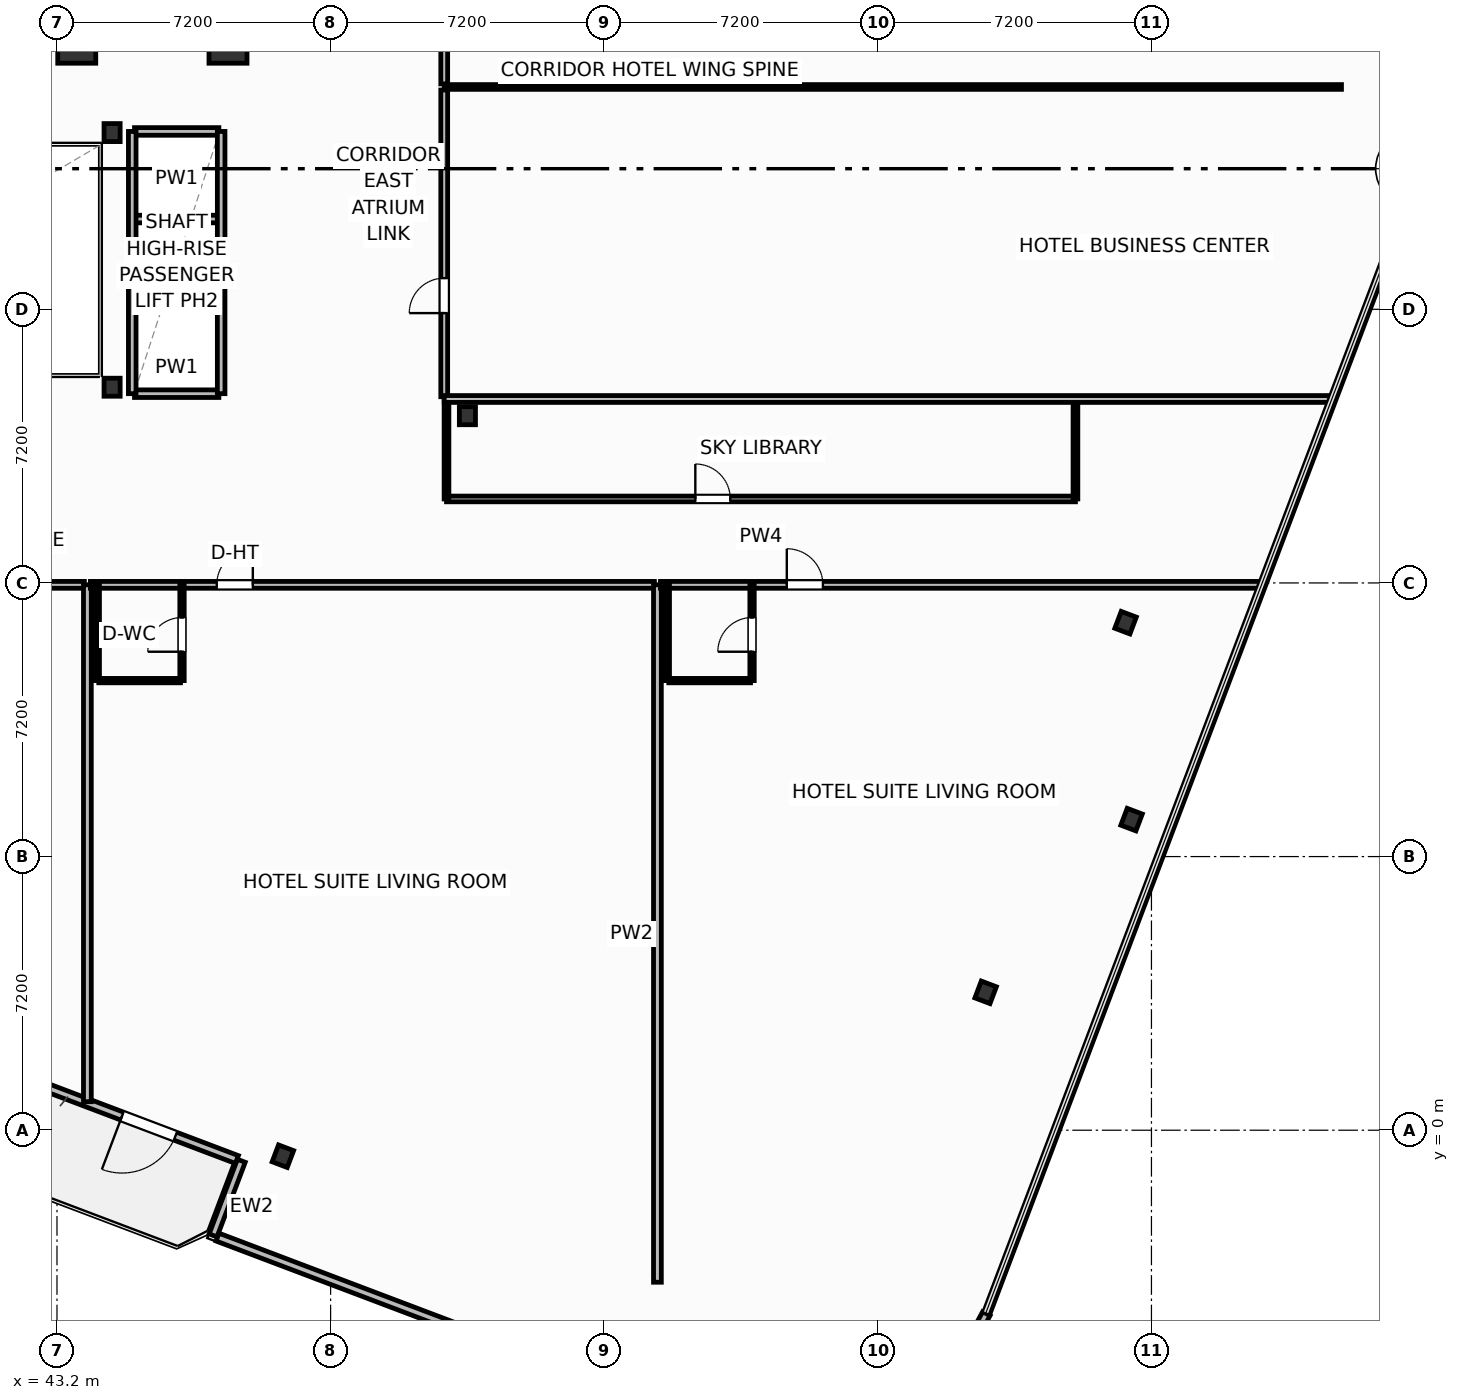
"""IFC4 building model, lengths in metres.
Left out: names, types, materials, properties, quantities, classifications, styles, units other than length and angle.
Written with IfcOpenShell. Run it as: python <this file> out.ifc"""

import sys

from ifc_helpers import new_model, si_unit, direction, frame, frame_2d, origin, origin_2d, place, context, subcontext, project, spatial, rectangle, i_section, extrude, element, fill, save


model = new_model("IFC4")
c1 = context("Model", 3, precision=1e-05, world=origin(), true_north=direction((0.0, 1.0)))
c2 = subcontext(c1, "Body", "Model", "MODEL_VIEW")
j1 = project(units=[si_unit("LENGTHUNIT", "METRE"), si_unit("PLANEANGLEUNIT", "RADIAN")], contexts=[c1])
p1 = place(None, origin())
s1 = spatial("IfcSite", under=j1, at=p1, CompositionType="ELEMENT")
p2 = place(p1, origin())
s2 = spatial("IfcBuilding", under=s1, at=p2, CompositionType="ELEMENT")
p3 = place(p2, frame((0.0, 0.0, 94.7)))
s3 = spatial("IfcBuildingStorey", under=s2, at=p3, CompositionType="ELEMENT", Elevation=94.7)
for number, where, z_axis, x_axis in (
    (1, (43.72, 28.75, 0.0), (0.0, 0.0, 1.0), (1.0, 0.0, 0.0)),
    (2, (47.7, 28.75, 0.0), (0.0, 0.0, 1.0), (1.0, 0.0, 0.0)),
):
    element("IfcColumn", number, at=place(p3, frame(where, z_axis=z_axis, x_axis=x_axis)), inside=s3, PredefinedType="COLUMN", context=c2, shape_type="SweptSolid", body=[
        extrude(rectangle(XDim=1.0, YDim=1.35, at=origin_2d()), origin(), (0.0, 0.0, 1.0), 3.7),
    ])
for number, where, z_axis, x_axis in (
    (3, (44.65, 19.55, 0.0), (0.0, 0.0, 1.0), (1.0, 0.0, 0.0)),
    (4, (44.65, 26.25, 0.0), (0.0, 0.0, 1.0), (1.0, 0.0, 0.0)),
    (5, (54.0, 18.8, 0.0), (0.0, 0.0, 1.0), (1.0, 0.0, 0.0)),
    (6, (49.144, -0.684, 0.0), (0.0, 0.0, 1.0), (0.935, -0.354, 0.0)),
    (7, (67.637, 3.628, 0.0), (0.0, 0.0, 1.0), (0.935, -0.354, 0.0)),
    (8, (71.477, 8.173, 0.0), (0.0, 0.0, 1.0), (0.935, -0.354, 0.0)),
    (9, (71.319, 13.354, 0.0), (0.0, 0.0, 1.0), (0.935, -0.354, 0.0)),
):
    element("IfcColumn", number, at=place(p3, frame(where, z_axis=z_axis, x_axis=x_axis)), inside=s3, PredefinedType="COLUMN", context=c2, shape_type="SweptSolid", body=[
        extrude(i_section(OverallWidth=0.424, OverallDepth=0.474, WebThickness=0.048, FlangeThickness=0.077, FilletRadius=0.025, at=origin_2d()), origin(), (0.0, 0.0, 1.0), 3.7),
    ])
p4 = place(p3, frame((47.935, -0.771, 0.0), z_axis=(0.0, 0.0, 1.0), x_axis=(-0.935227640088, 0.354046976001, 0.0)))
e10 = element("IfcWall", 10, at=p4, inside=s3, PredefinedType="SOLIDWALL", context=c2, shape_type="SweptSolid", body=[
    extrude(rectangle(XDim=6.0, YDim=0.22, at=frame_2d((3.0, 0.0))), origin(), (0.0, 0.0, 1.0), 2.73),
])
p5 = place(p4, frame((1.732, 0.0, 0.0)))
e11 = element("IfcOpeningElement", 11, at=p5, cuts=e10, PredefinedType="OPENING", context=c2, shape_type="SweptSolid", body=[
    extrude(rectangle(XDim=1.5, YDim=2.25, at=frame_2d((0.75, 1.125))), frame((0.0, 0.12, 0.0), z_axis=(0.0, -1.0, 0.0), x_axis=(1.0, 0.0, 0.0)), (0.0, 0.0, 1.0), 0.24),
])
p6 = place(p3, frame((48.051, -0.805, 0.0), z_axis=(0.0, 0.0, 1.0), x_axis=(-0.353988291547, -0.935249854022, 0.0)))
e12 = element("IfcWall", 12, at=p6, inside=s3, PredefinedType="SOLIDWALL", context=c2, shape_type="SweptSolid", body=[
    extrude(rectangle(XDim=2.1, YDim=0.22, at=frame_2d((1.05, 0.0))), origin(), (0.0, 0.0, 1.0), 2.73),
])
p7 = place(p3, frame((47.424, -2.813, 0.0), z_axis=(0.0, 0.0, 1.0), x_axis=(0.935225962032, -0.354051408614, 0.0)))
e13 = element("IfcWall", 13, at=p7, inside=s3, PredefinedType="SOLIDWALL", context=c2, shape_type="SweptSolid", body=[
    extrude(rectangle(XDim=14.347, YDim=0.22, at=frame_2d((7.173, 0.0))), origin(), (0.0, 0.0, 1.0), 2.73),
])
p8 = place(p7, frame((6.348, 0.0, 0.8)))
e14 = element("IfcOpeningElement", 14, at=p8, cuts=e13, PredefinedType="OPENING", context=c2, shape_type="SweptSolid", body=[
    extrude(rectangle(XDim=1.65, YDim=1.65, at=frame_2d((0.825, 0.825))), frame((0.0, 0.12, 0.0), z_axis=(0.0, -1.0, 0.0), x_axis=(1.0, 0.0, 0.0)), (0.0, 0.0, 1.0), 0.24),
])
p9 = place(p3, frame((67.015, -6.019, 0.0), z_axis=(0.0, 0.0, 1.0), x_axis=(0.473077364598, 0.881020889142, 0.0)))
e15 = element("IfcWall", 15, at=p9, inside=s3, PredefinedType="SOLIDWALL", context=c2, shape_type="SweptSolid", body=[
    extrude(rectangle(XDim=1.353, YDim=0.22, at=frame_2d((0.677, 0.0))), origin(), (0.0, 0.0, 1.0), 2.73),
])
p10 = place(p3, frame((53.45, 16.61, 0.0), z_axis=(0.0, 0.0, 1.0), x_axis=(1.0, 0.0, 0.0)))
e16 = element("IfcWall", 16, at=p10, inside=s3, PredefinedType="PARTITIONING", context=c2, shape_type="SweptSolid", body=[
    extrude(rectangle(XDim=16.55, YDim=0.15, at=frame_2d((8.275, 0.0))), origin(), (0.0, 0.0, 1.0), 2.58),
])
p11 = place(p10, frame((6.548, 0.0, 0.0)))
e17 = element("IfcOpeningElement", 17, at=p11, cuts=e16, PredefinedType="OPENING", context=c2, shape_type="SweptSolid", body=[
    extrude(rectangle(XDim=0.92, YDim=2.05, at=frame_2d((0.46, 1.025))), frame((0.0, 0.085, 0.0), z_axis=(0.0, -1.0, 0.0), x_axis=(1.0, 0.0, 0.0)), (0.0, 0.0, 1.0), 0.17),
])
p12 = place(p3, frame((53.45, 16.61, 0.0), z_axis=(0.0, 0.0, 1.0), x_axis=(0.0, 1.0, 0.0)))
e18 = element("IfcWall", 18, at=p12, inside=s3, PredefinedType="PARTITIONING", context=c2, shape_type="SweptSolid", body=[
    extrude(rectangle(XDim=2.63, YDim=0.125, at=frame_2d((1.315, 0.0))), origin(), (0.0, 0.0, 1.0), 2.58),
])
p13 = place(p3, frame((70.0, 16.61, 0.0), z_axis=(0.0, 0.0, 1.0), x_axis=(0.0, 1.0, 0.0)))
e19 = element("IfcWall", 19, at=p13, inside=s3, PredefinedType="PARTITIONING", context=c2, shape_type="SweptSolid", body=[
    extrude(rectangle(XDim=2.63, YDim=0.125, at=frame_2d((1.315, 0.0))), origin(), (0.0, 0.0, 1.0), 2.824),
])
p14 = place(p3, frame((26.08, 14.35, 0.0), z_axis=(0.0, 0.0, 1.0), x_axis=(1.0, 0.0, 0.0)))
e20 = element("IfcWall", 20, at=p14, inside=s3, PredefinedType="PARTITIONING", context=c2, shape_type="SweptSolid", body=[
    extrude(rectangle(XDim=17.84, YDim=0.18, at=frame_2d((8.92, 0.0))), origin(), (0.0, 0.0, 1.0), 3.45),
])
p15 = place(p14, frame((8.445, 0.0, 0.0)))
e21 = element("IfcOpeningElement", 21, at=p15, cuts=e20, PredefinedType="OPENING", context=c2, shape_type="SweptSolid", body=[
    extrude(rectangle(XDim=0.95, YDim=2.05, at=frame_2d((0.475, 1.025))), frame((0.0, 0.1, 0.0), z_axis=(0.0, -1.0, 0.0), x_axis=(1.0, 0.0, 0.0)), (0.0, 0.0, 1.0), 0.2),
])
p16 = place(p3, frame((44.0, 0.75, 0.0), z_axis=(0.0, 0.0, 1.0), x_axis=(0.0, 1.0, 0.0)))
e22 = element("IfcWall", 22, at=p16, inside=s3, PredefinedType="PARTITIONING", context=c2, shape_type="SweptSolid", body=[
    extrude(rectangle(XDim=13.6, YDim=0.205, at=frame_2d((6.8, 0.0))), origin(), (0.0, 0.0, 1.0), 3.45),
])
p17 = place(p3, frame((44.08, 14.35, 0.0), z_axis=(0.0, 0.0, 1.0), x_axis=(1.0, 0.0, 0.0)))
e23 = element("IfcWall", 23, at=p17, inside=s3, PredefinedType="PARTITIONING", context=c2, shape_type="SweptSolid", body=[
    extrude(rectangle(XDim=14.84, YDim=0.18, at=frame_2d((7.42, 0.0))), origin(), (0.0, 0.0, 1.0), 3.45),
])
p18 = place(p17, frame((3.323, 0.0, 0.0)))
e24 = element("IfcOpeningElement", 24, at=p18, cuts=e23, PredefinedType="OPENING", context=c2, shape_type="SweptSolid", body=[
    extrude(rectangle(XDim=0.95, YDim=2.15, at=frame_2d((0.475, 1.075))), frame((0.0, 0.1, 0.0), z_axis=(0.0, -1.0, 0.0), x_axis=(1.0, 0.0, 0.0)), (0.0, 0.0, 1.0), 0.2),
])
p19 = place(p3, frame((44.3, 11.83, 0.0), z_axis=(0.0, 0.0, 1.0), x_axis=(1.0, 0.0, 0.0)))
e25 = element("IfcWall", 25, at=p19, inside=s3, PredefinedType="PARTITIONING", context=c2, shape_type="SweptSolid", body=[
    extrude(rectangle(XDim=2.15, YDim=0.115, at=frame_2d((1.075, 0.0))), origin(), (0.0, 0.0, 1.0), 3.45),
])
p20 = place(p3, frame((46.49, 11.83, 0.0), z_axis=(0.0, 0.0, 1.0), x_axis=(0.0, 1.0, 0.0)))
e26 = element("IfcWall", 26, at=p20, inside=s3, PredefinedType="PARTITIONING", context=c2, shape_type="SweptSolid", body=[
    extrude(rectangle(XDim=2.52, YDim=0.115, at=frame_2d((1.26, 0.0))), origin(), (0.0, 0.0, 1.0), 3.45),
])
p21 = place(p20, frame((0.76, 0.0, 0.0)))
e27 = element("IfcOpeningElement", 27, at=p21, cuts=e26, PredefinedType="OPENING", context=c2, shape_type="SweptSolid", body=[
    extrude(rectangle(XDim=0.9, YDim=2.05, at=frame_2d((0.45, 1.025))), frame((0.0, 0.067, 0.0), z_axis=(0.0, -1.0, 0.0), x_axis=(1.0, 0.0, 0.0)), (0.0, 0.0, 1.0), 0.135),
])
p22 = place(p3, frame((44.26, 11.83, 0.0), z_axis=(0.0, 0.0, 1.0), x_axis=(0.0, 1.0, 0.0)))
e28 = element("IfcWall", 28, at=p22, inside=s3, PredefinedType="PARTITIONING", context=c2, shape_type="SweptSolid", body=[
    extrude(rectangle(XDim=2.52, YDim=0.115, at=frame_2d((1.26, 0.0))), origin(), (0.0, 0.0, 1.0), 3.45),
])
p23 = place(p3, frame((59.0, -4.0, 0.0), z_axis=(0.0, 0.0, 1.0), x_axis=(0.0, 1.0, 0.0)))
e29 = element("IfcWall", 29, at=p23, inside=s3, PredefinedType="PARTITIONING", context=c2, shape_type="SweptSolid", body=[
    extrude(rectangle(XDim=18.35, YDim=0.205, at=frame_2d((9.175, 0.0))), origin(), (0.0, 0.0, 1.0), 3.45),
])
p24 = place(p3, frame((59.08, 14.35, 0.0), z_axis=(0.0, 0.0, 1.0), x_axis=(1.0, 0.0, 0.0)))
e30 = element("IfcWall", 30, at=p24, inside=s3, PredefinedType="PARTITIONING", context=c2, shape_type="SweptSolid", body=[
    extrude(rectangle(XDim=15.775, YDim=0.18, at=frame_2d((7.888, 0.0))), origin(), (0.0, 0.0, 1.0), 2.58),
])
p25 = place(p24, frame((3.324, 0.0, 0.0)))
e31 = element("IfcOpeningElement", 31, at=p25, cuts=e30, PredefinedType="OPENING", context=c2, shape_type="SweptSolid", body=[
    extrude(rectangle(XDim=0.95, YDim=2.15, at=frame_2d((0.475, 1.075))), frame((0.0, 0.1, 0.0), z_axis=(0.0, -1.0, 0.0), x_axis=(1.0, 0.0, 0.0)), (0.0, 0.0, 1.0), 0.2),
])
p26 = place(p3, frame((59.3, 11.83, 0.0), z_axis=(0.0, 0.0, 1.0), x_axis=(1.0, 0.0, 0.0)))
e32 = element("IfcWall", 32, at=p26, inside=s3, PredefinedType="PARTITIONING", context=c2, shape_type="SweptSolid", body=[
    extrude(rectangle(XDim=2.15, YDim=0.115, at=frame_2d((1.075, 0.0))), origin(), (0.0, 0.0, 1.0), 3.45),
])
p27 = place(p3, frame((61.49, 11.83, 0.0), z_axis=(0.0, 0.0, 1.0), x_axis=(0.0, 1.0, 0.0)))
e33 = element("IfcWall", 33, at=p27, inside=s3, PredefinedType="PARTITIONING", context=c2, shape_type="SweptSolid", body=[
    extrude(rectangle(XDim=2.52, YDim=0.115, at=frame_2d((1.26, 0.0))), origin(), (0.0, 0.0, 1.0), 3.45),
])
p28 = place(p27, frame((0.76, 0.0, 0.0)))
e34 = element("IfcOpeningElement", 34, at=p28, cuts=e33, PredefinedType="OPENING", context=c2, shape_type="SweptSolid", body=[
    extrude(rectangle(XDim=0.9, YDim=2.05, at=frame_2d((0.45, 1.025))), frame((0.0, 0.067, 0.0), z_axis=(0.0, -1.0, 0.0), x_axis=(1.0, 0.0, 0.0)), (0.0, 0.0, 1.0), 0.135),
])
p29 = place(p3, frame((59.26, 11.83, 0.0), z_axis=(0.0, 0.0, 1.0), x_axis=(0.0, 1.0, 0.0)))
e35 = element("IfcWall", 35, at=p29, inside=s3, PredefinedType="PARTITIONING", context=c2, shape_type="SweptSolid", body=[
    extrude(rectangle(XDim=2.52, YDim=0.115, at=frame_2d((1.26, 0.0))), origin(), (0.0, 0.0, 1.0), 3.45),
])
p30 = place(p3, frame((53.39, 19.3, 0.0), z_axis=(0.0, 0.0, 1.0), x_axis=(0.0, 1.0, 0.0)))
e36 = element("IfcWall", 36, at=p30, inside=s3, PredefinedType="PARTITIONING", context=c2, shape_type="SweptSolid", body=[
    extrude(rectangle(XDim=8.07, YDim=0.18, at=frame_2d((4.035, 0.0))), origin(), (0.0, 0.0, 1.0), 3.45),
])
p31 = place(p30, frame((2.2, 0.0, 0.0)))
e37 = element("IfcOpeningElement", 37, at=p31, cuts=e36, PredefinedType="OPENING", context=c2, shape_type="SweptSolid", body=[
    extrude(rectangle(XDim=0.92, YDim=2.05, at=frame_2d((0.46, 1.025))), frame((0.0, 0.1, 0.0), z_axis=(0.0, -1.0, 0.0), x_axis=(1.0, 0.0, 0.0)), (0.0, 0.0, 1.0), 0.2),
])
p32 = place(p3, frame((53.39, 27.53, 0.0), z_axis=(0.0, 0.0, 1.0), x_axis=(0.0, 1.0, 0.0)))
e38 = element("IfcWall", 38, at=p32, inside=s3, PredefinedType="PARTITIONING", context=c2, shape_type="SweptSolid", body=[
    extrude(rectangle(XDim=11.67, YDim=0.18, at=frame_2d((5.835, 0.0))), origin(), (0.0, 0.0, 1.0), 3.45),
])
p33 = place(p32, frame((5.8, 0.0, 0.0)))
e39 = element("IfcOpeningElement", 39, at=p33, cuts=e38, PredefinedType="OPENING", context=c2, shape_type="SweptSolid", body=[
    extrude(rectangle(XDim=0.92, YDim=2.05, at=frame_2d((0.46, 1.025))), frame((0.0, 0.1, 0.0), z_axis=(0.0, -1.0, 0.0), x_axis=(1.0, 0.0, 0.0)), (0.0, 0.0, 1.0), 0.2),
])
p34 = place(p3, frame((53.39, 27.45, 0.0), z_axis=(0.0, 0.0, 1.0), x_axis=(1.0, 0.0, 0.0)))
e40 = element("IfcWall", 40, at=p34, inside=s3, PredefinedType="PARTITIONING", context=c2, shape_type="SweptSolid", body=[
    extrude(rectangle(XDim=23.61, YDim=0.125, at=frame_2d((11.805, 0.0))), origin(), (0.0, 0.0, 1.0), 3.45),
])
p35 = place(p3, frame((53.39, 19.24, 0.0), z_axis=(0.0, 0.0, 1.0), x_axis=(1.0, 0.0, 0.0)))
e41 = element("IfcWall", 41, at=p35, inside=s3, PredefinedType="PARTITIONING", context=c2, shape_type="SweptSolid", body=[
    extrude(rectangle(XDim=23.317, YDim=0.18, at=frame_2d((11.658, 0.0))), origin(), (0.0, 0.0, 1.0), 3.45),
])
for number, where, z_axis, x_axis in (
    (42, (45.24, 21.675, 0.0), (0.0, 0.0, 1.0), (1.0, 0.0, 0.0)),
    (43, (45.24, 23.975, 0.0), (0.0, 0.0, 1.0), (1.0, 0.0, 0.0)),
):
    element("IfcWall", number, at=place(p3, frame(where, z_axis=z_axis, x_axis=x_axis)), inside=s3, PredefinedType="PARTITIONING", context=c2, shape_type="SweptSolid", body=[
        extrude(rectangle(XDim=2.22, YDim=0.2, at=frame_2d((1.11, 0.0))), origin(), (0.0, 0.0, 1.0), 3.45),
    ])
p36 = place(p3, frame((45.24, 19.38, 0.0), z_axis=(0.0, 0.0, 1.0), x_axis=(1.0, 0.0, 0.0)))
e44 = element("IfcWall", 44, at=p36, inside=s3, PredefinedType="PARTITIONING", context=c2, shape_type="SweptSolid", body=[
    extrude(rectangle(XDim=2.22, YDim=0.2, at=frame_2d((1.11, 0.0))), origin(), (0.0, 0.0, 1.0), 2.662),
])
p37 = place(p3, frame((45.24, 26.28, 0.0), z_axis=(0.0, 0.0, 1.0), x_axis=(1.0, 0.0, 0.0)))
e45 = element("IfcWall", 45, at=p37, inside=s3, PredefinedType="PARTITIONING", context=c2, shape_type="SweptSolid", body=[
    extrude(rectangle(XDim=2.22, YDim=0.2, at=frame_2d((1.11, 0.0))), origin(), (0.0, 0.0, 1.0), 3.45),
])
for number, where, z_axis, x_axis in (
    (46, (45.18, 19.38, 0.0), (0.0, 0.0, 1.0), (0.0, 1.0, 0.0)),
    (47, (47.52, 19.38, 0.0), (0.0, 0.0, 1.0), (0.0, 1.0, 0.0)),
):
    element("IfcWall", number, at=place(p3, frame(where, z_axis=z_axis, x_axis=x_axis)), inside=s3, PredefinedType="PARTITIONING", context=c2, shape_type="SweptSolid", body=[
        extrude(rectangle(XDim=6.9, YDim=0.2, at=frame_2d((3.45, 0.0))), origin(), (0.0, 0.0, 1.0), 3.45),
    ])
p38 = place(p5, origin())
e48 = element("IfcDoor", 48, at=p38, inside=s3, OperationType="SINGLE_SWING_RIGHT", PredefinedType="DOOR", context=c2, shape_type="SweptSolid", body=[
    extrude(rectangle(XDim=1.5, YDim=2.25, at=frame_2d((0.75, 1.125))), frame((0.0, 0.025, 0.0), z_axis=(0.0, -1.0, 0.0), x_axis=(1.0, 0.0, 0.0)), (0.0, 0.0, 1.0), 0.05),
])
fill(e11, e48)
p39 = place(p11, origin())
e49 = element("IfcDoor", 49, at=p39, inside=s3, OperationType="SINGLE_SWING_LEFT", PredefinedType="DOOR", context=c2, shape_type="SweptSolid", body=[
    extrude(rectangle(XDim=0.92, YDim=2.05, at=frame_2d((0.46, 1.025))), frame((0.0, 0.025, 0.0), z_axis=(0.0, -1.0, 0.0), x_axis=(1.0, 0.0, 0.0)), (0.0, 0.0, 1.0), 0.05),
])
fill(e17, e49)
p40 = place(p18, origin())
e50 = element("IfcDoor", 50, at=p40, inside=s3, OperationType="SINGLE_SWING_RIGHT", PredefinedType="DOOR", context=c2, shape_type="SweptSolid", body=[
    extrude(rectangle(XDim=0.95, YDim=2.15, at=frame_2d((0.475, 1.075))), frame((0.0, 0.025, 0.0), z_axis=(0.0, -1.0, 0.0), x_axis=(1.0, 0.0, 0.0)), (0.0, 0.0, 1.0), 0.05),
])
fill(e24, e50)
p41 = place(p21, origin())
e51 = element("IfcDoor", 51, at=p41, inside=s3, OperationType="SINGLE_SWING_LEFT", PredefinedType="DOOR", context=c2, shape_type="SweptSolid", body=[
    extrude(rectangle(XDim=0.9, YDim=2.05, at=frame_2d((0.45, 1.025))), frame((0.0, 0.025, 0.0), z_axis=(0.0, -1.0, 0.0), x_axis=(1.0, 0.0, 0.0)), (0.0, 0.0, 1.0), 0.05),
])
fill(e27, e51)
p42 = place(p25, origin())
e52 = element("IfcDoor", 52, at=p42, inside=s3, OperationType="SINGLE_SWING_LEFT", PredefinedType="DOOR", context=c2, shape_type="SweptSolid", body=[
    extrude(rectangle(XDim=0.95, YDim=2.15, at=frame_2d((0.475, 1.075))), frame((0.0, 0.025, 0.0), z_axis=(0.0, -1.0, 0.0), x_axis=(1.0, 0.0, 0.0)), (0.0, 0.0, 1.0), 0.05),
])
fill(e31, e52)
p43 = place(p28, origin())
e53 = element("IfcDoor", 53, at=p43, inside=s3, OperationType="SINGLE_SWING_LEFT", PredefinedType="DOOR", context=c2, shape_type="SweptSolid", body=[
    extrude(rectangle(XDim=0.9, YDim=2.05, at=frame_2d((0.45, 1.025))), frame((0.0, 0.025, 0.0), z_axis=(0.0, -1.0, 0.0), x_axis=(1.0, 0.0, 0.0)), (0.0, 0.0, 1.0), 0.05),
])
fill(e34, e53)
p44 = place(p31, origin())
e54 = element("IfcDoor", 54, at=p44, inside=s3, OperationType="SINGLE_SWING_LEFT", PredefinedType="DOOR", context=c2, shape_type="SweptSolid", body=[
    extrude(rectangle(XDim=0.92, YDim=2.05, at=frame_2d((0.46, 1.025))), frame((0.0, 0.025, 0.0), z_axis=(0.0, -1.0, 0.0), x_axis=(1.0, 0.0, 0.0)), (0.0, 0.0, 1.0), 0.05),
])
fill(e37, e54)
save(model, sys.argv[1])
